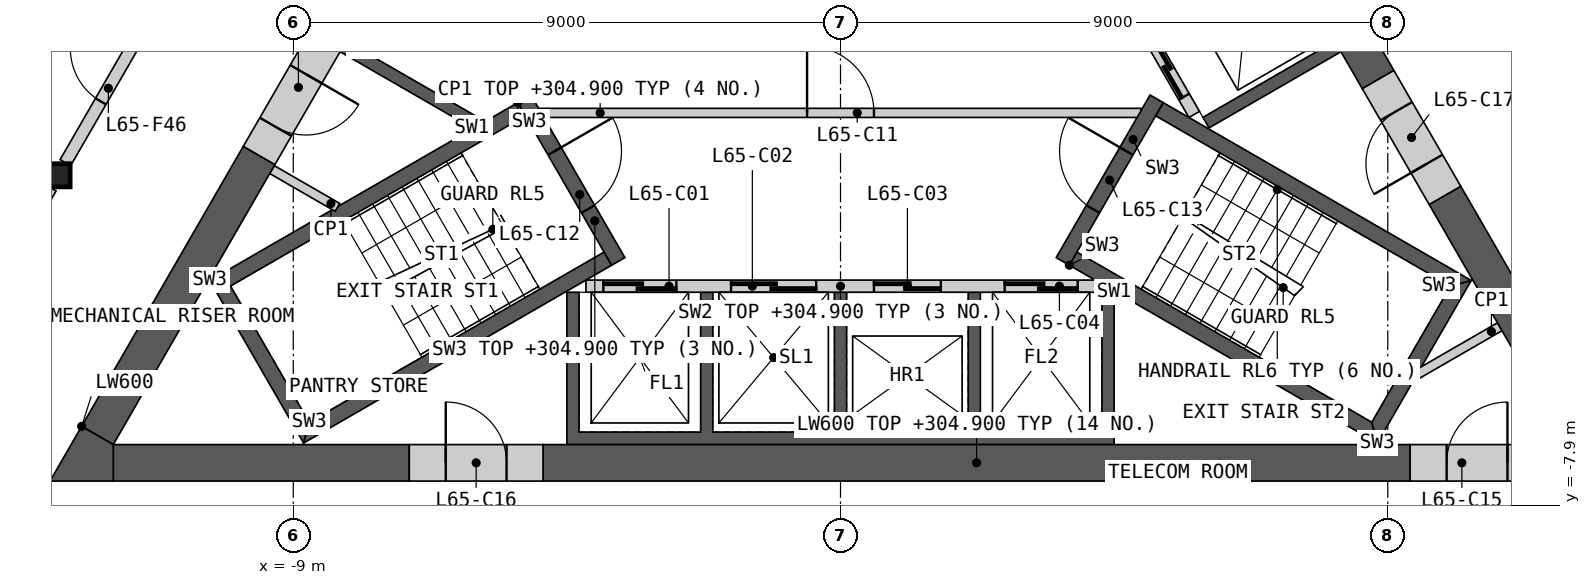
"""IFC4 building model, lengths in metres.
Left out: names, types, materials, properties, quantities, classifications, styles, units other than length and angle.
Written with IfcOpenShell. Run it as: python <this file> out.ifc"""

import sys

from ifc_helpers import new_model, si_unit, direction, frame, frame_2d, origin, origin_2d, place, context, subcontext, project, spatial, polyline, rectangle, i_section, outline, extrude, element, fill, save


model = new_model("IFC4")
c1 = context("Model", 3, precision=1e-05, world=origin(), true_north=direction((0.0, 1.0)))
c2 = subcontext(c1, "Body", "Model", "MODEL_VIEW")
j1 = project(units=[si_unit("LENGTHUNIT", "METRE"), si_unit("PLANEANGLEUNIT", "RADIAN")], contexts=[c1])
p1 = place(None, origin())
s1 = spatial("IfcSite", under=j1, at=p1, CompositionType="ELEMENT")
p2 = place(p1, origin())
s2 = spatial("IfcBuilding", under=s1, at=p2, CompositionType="ELEMENT")
p3 = place(p2, frame((0.0, 0.0, 301.8)))
s3 = spatial("IfcBuildingStorey", under=s2, at=p3, CompositionType="ELEMENT", Elevation=301.8)
p4 = place(p3, frame((-12.868, -2.476, 0.0), z_axis=(0.0, 0.0, 1.0), x_axis=(1.0, 0.0, 0.0)))
e1 = element("IfcColumn", 1, at=p4, inside=s3, PredefinedType="COLUMN", context=c2, shape_type="SweptSolid", body=[
    extrude(i_section(OverallWidth=0.396, OverallDepth=0.381, WebThickness=0.019, FlangeThickness=0.03, at=origin_2d()), origin(), (0.0, 0.0, 1.0), 3.4),
])
p5 = place(p3, origin())
e2 = element("IfcWall", 2, at=p5, inside=s3, PredefinedType="SHEAR", context=c2, shape_type="SweptSolid", body=[
    extrude(outline(polyline([(4.5, -4.4), (4.5, -6.906), (-4.5, -6.906), (-4.5, -4.4), (-4.3, -4.4), (-4.3, -6.7), (-2.3, -6.7), (-2.3, -4.4), (-2.1, -4.4), (-2.1, -6.7), (-0.1, -6.7), (-0.1, -4.4), (0.1, -4.4), (0.1, -6.7), (2.1, -6.7), (2.1, -4.4), (2.3, -4.4), (2.3, -6.7), (4.3, -6.7), (4.3, -4.4), (4.5, -4.4)])), origin(), (0.0, 0.0, 1.0), 3.1),
])
p6 = place(p3, frame((-4.187, -4.3, 0.0), z_axis=(0.0, 0.0, 1.0), x_axis=(1.0, 0.0, 0.0)))
e3 = element("IfcWall", 3, at=p6, inside=s3, PredefinedType="SOLIDWALL", context=c2, shape_type="SweptSolid", body=[
    extrude(rectangle(XDim=8.373, YDim=0.2, at=frame_2d((4.187, 0.0))), origin(), (0.0, 0.0, 1.0), 3.1),
])
p7 = place(p6, frame((0.287, 0.0, 0.0)))
e4 = element("IfcOpeningElement", 4, at=p7, cuts=e3, PredefinedType="OPENING", context=c2, shape_type="SweptSolid", body=[
    extrude(rectangle(XDim=1.2, YDim=2.1, at=frame_2d((0.6, 1.05))), frame((0.0, 0.11, 0.0), z_axis=(0.0, -1.0, 0.0), x_axis=(1.0, 0.0, 0.0)), (0.0, 0.0, 1.0), 0.22),
])
p8 = place(p6, frame((2.387, 0.0, 0.0)))
e5 = element("IfcOpeningElement", 5, at=p8, cuts=e3, PredefinedType="OPENING", context=c2, shape_type="SweptSolid", body=[
    extrude(rectangle(XDim=1.4, YDim=2.1, at=frame_2d((0.7, 1.05))), frame((0.0, 0.11, 0.0), z_axis=(0.0, -1.0, 0.0), x_axis=(1.0, 0.0, 0.0)), (0.0, 0.0, 1.0), 0.22),
])
p9 = place(p6, frame((4.737, 0.0, 0.0)))
e6 = element("IfcOpeningElement", 6, at=p9, cuts=e3, PredefinedType="OPENING", context=c2, shape_type="SweptSolid", body=[
    extrude(rectangle(XDim=1.1, YDim=2.1, at=frame_2d((0.55, 1.05))), frame((0.0, 0.11, 0.0), z_axis=(0.0, -1.0, 0.0), x_axis=(1.0, 0.0, 0.0)), (0.0, 0.0, 1.0), 0.22),
])
p10 = place(p6, frame((6.887, 0.0, 0.0)))
e7 = element("IfcOpeningElement", 7, at=p10, cuts=e3, PredefinedType="OPENING", context=c2, shape_type="SweptSolid", body=[
    extrude(rectangle(XDim=1.2, YDim=2.1, at=frame_2d((0.6, 1.05))), frame((0.0, 0.11, 0.0), z_axis=(0.0, -1.0, 0.0), x_axis=(1.0, 0.0, 0.0)), (0.0, 0.0, 1.0), 0.22),
])
p11 = place(p3, origin())
e8 = element("IfcWall", 8, at=p11, inside=s3, PredefinedType="SHEAR", context=c2, shape_type="SweptSolid", body=[
    extrude(outline(polyline([(1.561, 6.097), (3.731, 7.35), (8.231, -0.444), (6.061, -1.697), (5.96, -1.524), (7.952, -0.374), (6.952, 1.358), (4.96, 0.208), (4.861, 0.381), (6.852, 1.531), (5.852, 3.263), (3.861, 2.113), (3.76, 2.287), (5.752, 3.437), (4.752, 5.169), (2.76, 4.019), (2.66, 4.192), (4.652, 5.342), (3.652, 7.074), (1.66, 5.924), (1.561, 6.097)])), origin(), (0.0, 0.0, 1.0), 3.1),
])
p12 = place(p3, frame((5.817, -1.476, 0.0), z_axis=(0.0, 0.0, 1.0), x_axis=(-0.500002616675, 0.866023893041, 0.0)))
e9 = element("IfcWall", 9, at=p12, inside=s3, PredefinedType="SOLIDWALL", context=c2, shape_type="SweptSolid", body=[
    extrude(rectangle(XDim=8.373, YDim=0.2, at=frame_2d((4.187, 0.0))), origin(), (0.0, 0.0, 1.0), 3.1),
])
p13 = place(p12, frame((0.337, 0.0, 0.0)))
e10 = element("IfcOpeningElement", 10, at=p13, cuts=e9, PredefinedType="OPENING", context=c2, shape_type="SweptSolid", body=[
    extrude(rectangle(XDim=1.1, YDim=2.1, at=frame_2d((0.55, 1.05))), frame((0.0, 0.11, 0.0), z_axis=(0.0, -1.0, 0.0), x_axis=(1.0, 0.0, 0.0)), (0.0, 0.0, 1.0), 0.22),
])
p14 = place(p12, frame((2.537, 0.0, 0.0)))
e11 = element("IfcOpeningElement", 11, at=p14, cuts=e9, PredefinedType="OPENING", context=c2, shape_type="SweptSolid", body=[
    extrude(rectangle(XDim=1.1, YDim=2.1, at=frame_2d((0.55, 1.05))), frame((0.0, 0.11, 0.0), z_axis=(0.0, -1.0, 0.0), x_axis=(1.0, 0.0, 0.0)), (0.0, 0.0, 1.0), 0.22),
])
p15 = place(p12, frame((4.737, 0.0, 0.0)))
e12 = element("IfcOpeningElement", 12, at=p15, cuts=e9, PredefinedType="OPENING", context=c2, shape_type="SweptSolid", body=[
    extrude(rectangle(XDim=1.1, YDim=2.1, at=frame_2d((0.55, 1.05))), frame((0.0, 0.11, 0.0), z_axis=(0.0, -1.0, 0.0), x_axis=(1.0, 0.0, 0.0)), (0.0, 0.0, 1.0), 0.22),
])
p16 = place(p12, frame((7.037, 0.0, 0.0)))
e13 = element("IfcOpeningElement", 13, at=p16, cuts=e9, PredefinedType="OPENING", context=c2, shape_type="SweptSolid", body=[
    extrude(rectangle(XDim=0.9, YDim=2.1, at=frame_2d((0.45, 1.05))), frame((0.0, 0.11, 0.0), z_axis=(0.0, -1.0, 0.0), x_axis=(1.0, 0.0, 0.0)), (0.0, 0.0, 1.0), 0.22),
])
p17 = place(p3, origin())
e14 = element("IfcWall", 14, at=p17, inside=s3, PredefinedType="SHEAR", context=c2, shape_type="SweptSolid", body=[
    extrude(outline(polyline([(-6.061, -1.697), (-8.231, -0.444), (-8.131, -0.271), (-5.96, -1.524), (-6.061, -1.697)])), origin(), (0.0, 0.0, 1.0), 3.1),
])
p18 = place(p3, frame((-4.941, -1.45, 0.0), z_axis=(0.0, 0.0, 1.0), x_axis=(1.0, 0.0, 0.0)))
e15 = element("IfcWall", 15, at=p18, inside=s3, PredefinedType="PARTITIONING", context=c2, shape_type="SweptSolid", body=[
    extrude(rectangle(XDim=9.882, YDim=0.15, at=frame_2d((4.941, 0.0))), origin(), (0.0, 0.0, 1.0), 3.1),
])
p19 = place(p18, frame((4.391, 0.0, 0.0)))
e16 = element("IfcOpeningElement", 16, at=p19, cuts=e15, PredefinedType="OPENING", context=c2, shape_type="SweptSolid", body=[
    extrude(rectangle(XDim=1.1, YDim=2.1, at=frame_2d((0.55, 1.05))), frame((0.0, 0.085, 0.0), z_axis=(0.0, -1.0, 0.0), x_axis=(1.0, 0.0, 0.0)), (0.0, 0.0, 1.0), 0.17),
])
p20 = place(p3, origin())
e17 = element("IfcWall", 17, at=p20, inside=s3, PredefinedType="SHEAR", context=c2, shape_type="SweptSolid", body=[
    extrude(outline(polyline([(-5.307, -1.281), (-10.374, -4.206), (-10.032, -4.298), (-5.182, -1.498), (-5.307, -1.281)])), origin(), (0.0, 0.0, 1.0), 3.1),
])
p21 = place(p3, origin())
e18 = element("IfcWall", 18, at=p21, inside=s3, PredefinedType="SHEAR", context=c2, shape_type="SweptSolid", body=[
    extrude(outline(polyline([(-10.374, -4.206), (-8.83, -6.881), (-8.738, -6.539), (-10.032, -4.298), (-10.374, -4.206)])), origin(), (0.0, 0.0, 1.0), 3.1),
])
p22 = place(p3, origin())
e19 = element("IfcWall", 19, at=p22, inside=s3, PredefinedType="SHEAR", context=c2, shape_type="SweptSolid", body=[
    extrude(outline(polyline([(-8.738, -6.539), (-8.83, -6.881), (-3.763, -3.956), (-3.888, -3.739), (-8.738, -6.539)])), origin(), (0.0, 0.0, 1.0), 3.1),
])
p23 = place(p3, frame((-5.199, -1.219, 0.0), z_axis=(0.0, 0.0, 1.0), x_axis=(0.499982516597, -0.866035497597, 0.0)))
e20 = element("IfcWall", 20, at=p23, inside=s3, PredefinedType="SHEAR", context=c2, shape_type="SweptSolid", body=[
    extrude(rectangle(XDim=3.088, YDim=0.25, at=frame_2d((1.544, 0.0))), origin(), (0.0, 0.0, 1.0), 3.1),
])
p24 = place(p23, frame((0.994, 0.0, 0.0)))
e21 = element("IfcOpeningElement", 21, at=p24, cuts=e20, PredefinedType="OPENING", context=c2, shape_type="SweptSolid", body=[
    extrude(rectangle(XDim=1.1, YDim=2.1, at=frame_2d((0.55, 1.05))), frame((0.0, 0.135, 0.0), z_axis=(0.0, -1.0, 0.0), x_axis=(1.0, 0.0, 0.0)), (0.0, 0.0, 1.0), 0.27),
])
p25 = place(p3, origin())
e22 = element("IfcWall", 22, at=p25, inside=s3, PredefinedType="SHEAR", context=c2, shape_type="SweptSolid", body=[
    extrude(outline(polyline([(3.763, -3.956), (8.83, -6.881), (8.738, -6.539), (3.888, -3.739), (3.763, -3.956)])), origin(), (0.0, 0.0, 1.0), 3.1),
])
p26 = place(p3, origin())
e23 = element("IfcWall", 23, at=p26, inside=s3, PredefinedType="SHEAR", context=c2, shape_type="SweptSolid", body=[
    extrude(outline(polyline([(8.83, -6.881), (10.374, -4.206), (10.032, -4.298), (8.738, -6.539), (8.83, -6.881)])), origin(), (0.0, 0.0, 1.0), 3.1),
])
p27 = place(p3, origin())
e24 = element("IfcWall", 24, at=p27, inside=s3, PredefinedType="SHEAR", context=c2, shape_type="SweptSolid", body=[
    extrude(outline(polyline([(10.032, -4.298), (10.374, -4.206), (5.307, -1.281), (5.182, -1.498), (10.032, -4.298)])), origin(), (0.0, 0.0, 1.0), 3.1),
])
p28 = place(p3, frame((3.655, -3.893, 0.0), z_axis=(0.0, 0.0, 1.0), x_axis=(0.499982516597, 0.866035497597, 0.0)))
e25 = element("IfcWall", 25, at=p28, inside=s3, PredefinedType="SHEAR", context=c2, shape_type="SweptSolid", body=[
    extrude(rectangle(XDim=3.088, YDim=0.25, at=frame_2d((1.544, 0.0))), origin(), (0.0, 0.0, 1.0), 3.1),
])
p29 = place(p28, frame((0.994, 0.0, 0.0)))
e26 = element("IfcOpeningElement", 26, at=p29, cuts=e25, PredefinedType="OPENING", context=c2, shape_type="SweptSolid", body=[
    extrude(rectangle(XDim=1.1, YDim=2.1, at=frame_2d((0.55, 1.05))), frame((0.0, 0.135, 0.0), z_axis=(0.0, -1.0, 0.0), x_axis=(1.0, 0.0, 0.0)), (0.0, 0.0, 1.0), 0.27),
])
p30 = place(p3, frame((-9.35, -2.383, 0.0), z_axis=(0.0, 0.0, 1.0), x_axis=(0.866057962423, -0.499943602543, 0.0)))
e27 = element("IfcWall", 27, at=p30, inside=s3, PredefinedType="PARTITIONING", context=c2, shape_type="SweptSolid", body=[
    extrude(rectangle(XDim=1.242, YDim=0.15, at=frame_2d((0.621, 0.0))), origin(), (0.0, 0.0, 1.0), 3.1),
])
p31 = place(p3, frame((10.842, -4.967, 0.0), z_axis=(0.0, 0.0, 1.0), x_axis=(-0.866098216386, -0.499873863663, 0.0)))
e28 = element("IfcWall", 28, at=p31, inside=s3, PredefinedType="PARTITIONING", context=c2, shape_type="SweptSolid", body=[
    extrude(rectangle(XDim=1.582, YDim=0.15, at=frame_2d((0.791, 0.0))), origin(), (0.0, 0.0, 1.0), 3.1),
])
p32 = place(p3, frame((-4.892, -7.206, 0.0), z_axis=(0.0, 0.0, 1.0), x_axis=(1.0, 0.0, 0.0)))
e29 = element("IfcWall", 29, at=p32, inside=s3, PredefinedType="SHEAR", context=c2, shape_type="SweptSolid", body=[
    extrude(rectangle(XDim=14.261, YDim=0.6, at=frame_2d((7.13, 0.0))), origin(), (0.0, 0.0, 1.0), 3.1),
])
p33 = place(p3, frame((-11.961, -7.206, 0.0), z_axis=(0.0, 0.0, 1.0), x_axis=(1.0, 0.0, 0.0)))
e30 = element("IfcWall", 30, at=p33, inside=s3, PredefinedType="SHEAR", context=c2, shape_type="SweptSolid", body=[
    extrude(rectangle(XDim=4.868, YDim=0.6, at=frame_2d((2.434, 0.0))), origin(), (0.0, 0.0, 1.0), 3.1),
])
p34 = place(p3, frame((8.841, -0.902, 0.0), z_axis=(0.0, 0.0, 1.0), x_axis=(-0.499995618375, 0.866027933502, 0.0)))
e31 = element("IfcWall", 31, at=p34, inside=s3, PredefinedType="SHEAR", context=c2, shape_type="SweptSolid", body=[
    extrude(rectangle(XDim=14.571, YDim=0.6, at=frame_2d((7.285, 0.0))), origin(), (0.0, 0.0, 1.0), 3.1),
])
p35 = place(p3, frame((12.221, -6.756, 0.0), z_axis=(0.0, 0.0, 1.0), x_axis=(-0.500020646047, 0.866013483456, 0.0)))
e32 = element("IfcWall", 32, at=p35, inside=s3, PredefinedType="SHEAR", context=c2, shape_type="SweptSolid", body=[
    extrude(rectangle(XDim=4.559, YDim=0.6, at=frame_2d((2.28, 0.0))), origin(), (0.0, 0.0, 1.0), 3.1),
])
p36 = place(p3, frame((-9.562, -2.15, 0.0), z_axis=(0.0, 0.0, 1.0), x_axis=(-0.500015214976, -0.866016619236, 0.0)))
e33 = element("IfcWall", 33, at=p36, inside=s3, PredefinedType="SHEAR", context=c2, shape_type="SweptSolid", body=[
    extrude(rectangle(XDim=5.318, YDim=0.6, at=frame_2d((2.659, 0.0))), origin(), (0.0, 0.0, 1.0), 3.1),
])
p37 = place(p3, origin())
e34 = element("IfcWall", 34, at=p37, inside=s3, PredefinedType="SHEAR", context=c2, shape_type="SweptSolid", body=[
    extrude(outline(polyline([(-12.48, -6.606), (-11.961, -6.906), (-11.961, -7.506), (-13.0, -7.506), (-12.48, -6.606)])), origin(), (0.0, 0.0, 1.0), 3.1),
])
p38 = place(p3, frame((9.369, -7.206, 0.0), z_axis=(0.0, 0.0, 1.0), x_axis=(1.0, 0.0, 0.0)))
e35 = element("IfcWall", 35, at=p38, inside=s3, PredefinedType="SHEAR", context=c2, shape_type="SweptSolid", body=[
    extrude(rectangle(XDim=2.592, YDim=0.6, at=frame_2d((1.296, 0.0))), origin(), (0.0, 0.0, 1.0), 3.1),
])
p39 = place(p38, frame((0.6, 0.0, 0.0)))
e36 = element("IfcOpeningElement", 36, at=p39, cuts=e35, PredefinedType="OPENING", context=c2, shape_type="SweptSolid", body=[
    extrude(rectangle(XDim=1.0, YDim=2.1, at=frame_2d((0.5, 1.05))), frame((0.0, 0.31, 0.0), z_axis=(0.0, -1.0, 0.0), x_axis=(1.0, 0.0, 0.0)), (0.0, 0.0, 1.0), 0.62),
])
p40 = place(p3, frame((-7.092, -7.206, 0.0), z_axis=(0.0, 0.0, 1.0), x_axis=(1.0, 0.0, 0.0)))
e37 = element("IfcWall", 37, at=p40, inside=s3, PredefinedType="SHEAR", context=c2, shape_type="SweptSolid", body=[
    extrude(rectangle(XDim=2.2, YDim=0.6, at=frame_2d((1.1, 0.0))), origin(), (0.0, 0.0, 1.0), 3.1),
])
p41 = place(p40, frame((0.6, 0.0, 0.0)))
e38 = element("IfcOpeningElement", 38, at=p41, cuts=e37, PredefinedType="OPENING", context=c2, shape_type="SweptSolid", body=[
    extrude(rectangle(XDim=1.0, YDim=2.1, at=frame_2d((0.5, 1.05))), frame((0.0, 0.31, 0.0), z_axis=(0.0, -1.0, 0.0), x_axis=(1.0, 0.0, 0.0)), (0.0, 0.0, 1.0), 0.62),
])
p42 = place(p3, frame((9.941, -2.807, 0.0), z_axis=(0.0, 0.0, 1.0), x_axis=(-0.499994660107, 0.866028486751, 0.0)))
e39 = element("IfcWall", 39, at=p42, inside=s3, PredefinedType="SHEAR", context=c2, shape_type="SweptSolid", body=[
    extrude(rectangle(XDim=2.2, YDim=0.6, at=frame_2d((1.1, 0.0))), origin(), (0.0, 0.0, 1.0), 3.1),
])
p43 = place(p42, frame((0.6, 0.0, 0.0)))
e40 = element("IfcOpeningElement", 40, at=p43, cuts=e39, PredefinedType="OPENING", context=c2, shape_type="SweptSolid", body=[
    extrude(rectangle(XDim=1.0, YDim=2.1, at=frame_2d((0.5, 1.05))), frame((0.0, 0.31, 0.0), z_axis=(0.0, -1.0, 0.0), x_axis=(1.0, 0.0, 0.0)), (0.0, 0.0, 1.0), 0.62),
])
p44 = place(p3, frame((-8.44, -0.208, 0.0), z_axis=(0.0, 0.0, 1.0), x_axis=(-0.500001951578, -0.866024277037, 0.0)))
e41 = element("IfcWall", 41, at=p44, inside=s3, PredefinedType="SHEAR", context=c2, shape_type="SweptSolid", body=[
    extrude(rectangle(XDim=2.243, YDim=0.6, at=frame_2d((1.122, 0.0))), origin(), (0.0, 0.0, 1.0), 3.1),
])
p45 = place(p44, frame((0.7, 0.0, 0.0)))
e42 = element("IfcOpeningElement", 42, at=p45, cuts=e41, PredefinedType="OPENING", context=c2, shape_type="SweptSolid", body=[
    extrude(rectangle(XDim=1.0, YDim=2.1, at=frame_2d((0.5, 1.05))), frame((0.0, 0.31, 0.0), z_axis=(0.0, -1.0, 0.0), x_axis=(1.0, 0.0, 0.0)), (0.0, 0.0, 1.0), 0.62),
])
p46 = place(p3, frame((8.698, 4.745, 0.0), z_axis=(0.0, 0.0, 1.0), x_axis=(0.499984266882, -0.866034487114, 0.0)))
e43 = element("IfcWall", 43, at=p46, inside=s3, PredefinedType="PARTITIONING", context=c2, shape_type="SweptSolid", body=[
    extrude(rectangle(XDim=8.099, YDim=0.2, at=frame_2d((4.049, 0.0))), origin(), (0.0, 0.0, 1.0), 3.1),
])
p47 = place(p46, frame((5.732, 0.0, 0.0)))
e44 = element("IfcOpeningElement", 44, at=p47, cuts=e43, PredefinedType="OPENING", context=c2, shape_type="SweptSolid", body=[
    extrude(rectangle(XDim=1.0, YDim=2.1, at=frame_2d((0.5, 1.05))), frame((0.0, 0.11, 0.0), z_axis=(0.0, -1.0, 0.0), x_axis=(1.0, 0.0, 0.0)), (0.0, 0.0, 1.0), 0.22),
])
p48 = place(p3, frame((-12.748, -2.269, 0.0), z_axis=(0.0, 0.0, 1.0), x_axis=(0.499984266882, 0.866034487114, 0.0)))
e45 = element("IfcWall", 45, at=p48, inside=s3, PredefinedType="PARTITIONING", context=c2, shape_type="SweptSolid", body=[
    extrude(rectangle(XDim=8.099, YDim=0.2, at=frame_2d((4.049, 0.0))), origin(), (0.0, 0.0, 1.0), 3.1),
])
p49 = place(p48, frame((1.164, 0.0, 0.0)))
e46 = element("IfcOpeningElement", 46, at=p49, cuts=e45, PredefinedType="OPENING", context=c2, shape_type="SweptSolid", body=[
    extrude(rectangle(XDim=1.0, YDim=2.1, at=frame_2d((0.5, 1.05))), frame((0.0, 0.11, 0.0), z_axis=(0.0, -1.0, 0.0), x_axis=(1.0, 0.0, 0.0)), (0.0, 0.0, 1.0), 0.22),
])
p50 = place(p3, frame((-15.131, -6.397, 0.0), z_axis=(0.0, 0.0, 1.0), x_axis=(0.500003406062, 0.866023437285, 0.0)))
e47 = element("IfcWall", 47, at=p50, inside=s3, PredefinedType="PARTITIONING", context=c2, shape_type="SweptSolid", body=[
    extrude(rectangle(XDim=4.288, YDim=0.2, at=frame_2d((2.144, 0.0))), origin(), (0.0, 0.0, 1.0), 3.1),
])
p51 = place(p7, origin())
e48 = element("IfcDoor", 48, at=p51, inside=s3, OperationType="SLIDING_TO_LEFT", PredefinedType="DOOR", context=c2, shape_type="SweptSolid", body=[
    extrude(rectangle(XDim=1.2, YDim=2.1, at=frame_2d((0.6, 1.05))), frame((0.0, 0.025, 0.0), z_axis=(0.0, -1.0, 0.0), x_axis=(1.0, 0.0, 0.0)), (0.0, 0.0, 1.0), 0.05),
])
fill(e4, e48)
p52 = place(p8, origin())
e49 = element("IfcDoor", 49, at=p52, inside=s3, OperationType="SLIDING_TO_LEFT", PredefinedType="DOOR", context=c2, shape_type="SweptSolid", body=[
    extrude(rectangle(XDim=1.4, YDim=2.1, at=frame_2d((0.7, 1.05))), frame((0.0, 0.025, 0.0), z_axis=(0.0, -1.0, 0.0), x_axis=(1.0, 0.0, 0.0)), (0.0, 0.0, 1.0), 0.05),
])
fill(e5, e49)
p53 = place(p9, origin())
e50 = element("IfcDoor", 50, at=p53, inside=s3, OperationType="SLIDING_TO_LEFT", PredefinedType="DOOR", context=c2, shape_type="SweptSolid", body=[
    extrude(rectangle(XDim=1.1, YDim=2.1, at=frame_2d((0.55, 1.05))), frame((0.0, 0.025, 0.0), z_axis=(0.0, -1.0, 0.0), x_axis=(1.0, 0.0, 0.0)), (0.0, 0.0, 1.0), 0.05),
])
fill(e6, e50)
p54 = place(p10, origin())
e51 = element("IfcDoor", 51, at=p54, inside=s3, OperationType="SLIDING_TO_LEFT", PredefinedType="DOOR", context=c2, shape_type="SweptSolid", body=[
    extrude(rectangle(XDim=1.2, YDim=2.1, at=frame_2d((0.6, 1.05))), frame((0.0, 0.025, 0.0), z_axis=(0.0, -1.0, 0.0), x_axis=(1.0, 0.0, 0.0)), (0.0, 0.0, 1.0), 0.05),
])
fill(e7, e51)
p55 = place(p13, origin())
e52 = element("IfcDoor", 52, at=p55, inside=s3, OperationType="SLIDING_TO_LEFT", PredefinedType="DOOR", context=c2, shape_type="SweptSolid", body=[
    extrude(rectangle(XDim=1.1, YDim=2.1, at=frame_2d((0.55, 1.05))), frame((0.0, 0.025, 0.0), z_axis=(0.0, -1.0, 0.0), x_axis=(1.0, 0.0, 0.0)), (0.0, 0.0, 1.0), 0.05),
])
fill(e10, e52)
p56 = place(p19, origin())
e53 = element("IfcDoor", 53, at=p56, inside=s3, OperationType="SINGLE_SWING_LEFT", PredefinedType="DOOR", context=c2, shape_type="SweptSolid", body=[
    extrude(rectangle(XDim=1.1, YDim=2.1, at=frame_2d((0.55, 1.05))), frame((0.0, 0.025, 0.0), z_axis=(0.0, -1.0, 0.0), x_axis=(1.0, 0.0, 0.0)), (0.0, 0.0, 1.0), 0.05),
])
fill(e16, e53)
p57 = place(p24, origin())
e54 = element("IfcDoor", 54, at=p57, inside=s3, OperationType="SINGLE_SWING_LEFT", PredefinedType="DOOR", context=c2, shape_type="SweptSolid", body=[
    extrude(rectangle(XDim=1.1, YDim=2.1, at=frame_2d((0.55, 1.05))), frame((0.0, 0.025, 0.0), z_axis=(0.0, -1.0, 0.0), x_axis=(1.0, 0.0, 0.0)), (0.0, 0.0, 1.0), 0.05),
])
fill(e21, e54)
p58 = place(p29, origin())
e55 = element("IfcDoor", 55, at=p58, inside=s3, OperationType="SINGLE_SWING_RIGHT", PredefinedType="DOOR", context=c2, shape_type="SweptSolid", body=[
    extrude(rectangle(XDim=1.1, YDim=2.1, at=frame_2d((0.55, 1.05))), frame((0.0, 0.025, 0.0), z_axis=(0.0, -1.0, 0.0), x_axis=(1.0, 0.0, 0.0)), (0.0, 0.0, 1.0), 0.05),
])
fill(e26, e55)
p59 = place(p39, origin())
e56 = element("IfcDoor", 56, at=p59, inside=s3, OperationType="SINGLE_SWING_RIGHT", PredefinedType="DOOR", context=c2, shape_type="SweptSolid", body=[
    extrude(rectangle(XDim=1.0, YDim=2.1, at=frame_2d((0.5, 1.05))), frame((0.0, 0.055, 0.0), z_axis=(0.0, -1.0, 0.0), x_axis=(1.0, 0.0, 0.0)), (0.0, 0.0, 1.0), 0.05),
])
fill(e36, e56)
p60 = place(p41, origin())
e57 = element("IfcDoor", 57, at=p60, inside=s3, OperationType="SINGLE_SWING_LEFT", PredefinedType="DOOR", context=c2, shape_type="SweptSolid", body=[
    extrude(rectangle(XDim=1.0, YDim=2.1, at=frame_2d((0.5, 1.05))), frame((0.0, 0.055, 0.0), z_axis=(0.0, -1.0, 0.0), x_axis=(1.0, 0.0, 0.0)), (0.0, 0.0, 1.0), 0.05),
])
fill(e38, e57)
p61 = place(p43, origin())
e58 = element("IfcDoor", 58, at=p61, inside=s3, OperationType="SINGLE_SWING_LEFT", PredefinedType="DOOR", context=c2, shape_type="SweptSolid", body=[
    extrude(rectangle(XDim=1.0, YDim=2.1, at=frame_2d((0.5, 1.05))), frame((0.0, 0.055, 0.0), z_axis=(0.0, -1.0, 0.0), x_axis=(1.0, 0.0, 0.0)), (0.0, 0.0, 1.0), 0.05),
])
fill(e40, e58)
p62 = place(p45, origin())
e59 = element("IfcDoor", 59, at=p62, inside=s3, OperationType="SINGLE_SWING_LEFT", PredefinedType="DOOR", context=c2, shape_type="SweptSolid", body=[
    extrude(rectangle(XDim=1.0, YDim=2.1, at=frame_2d((0.5, 1.05))), frame((0.0, 0.055, 0.0), z_axis=(0.0, -1.0, 0.0), x_axis=(1.0, 0.0, 0.0)), (0.0, 0.0, 1.0), 0.05),
])
fill(e42, e59)
p63 = place(p49, origin())
e60 = element("IfcDoor", 60, at=p63, inside=s3, OperationType="SINGLE_SWING_RIGHT", PredefinedType="DOOR", context=c2, shape_type="SweptSolid", body=[
    extrude(rectangle(XDim=1.0, YDim=2.1, at=frame_2d((0.5, 1.05))), frame((0.0, 0.025, 0.0), z_axis=(0.0, -1.0, 0.0), x_axis=(1.0, 0.0, 0.0)), (0.0, 0.0, 1.0), 0.05),
])
fill(e46, e60)
save(model, sys.argv[1])
